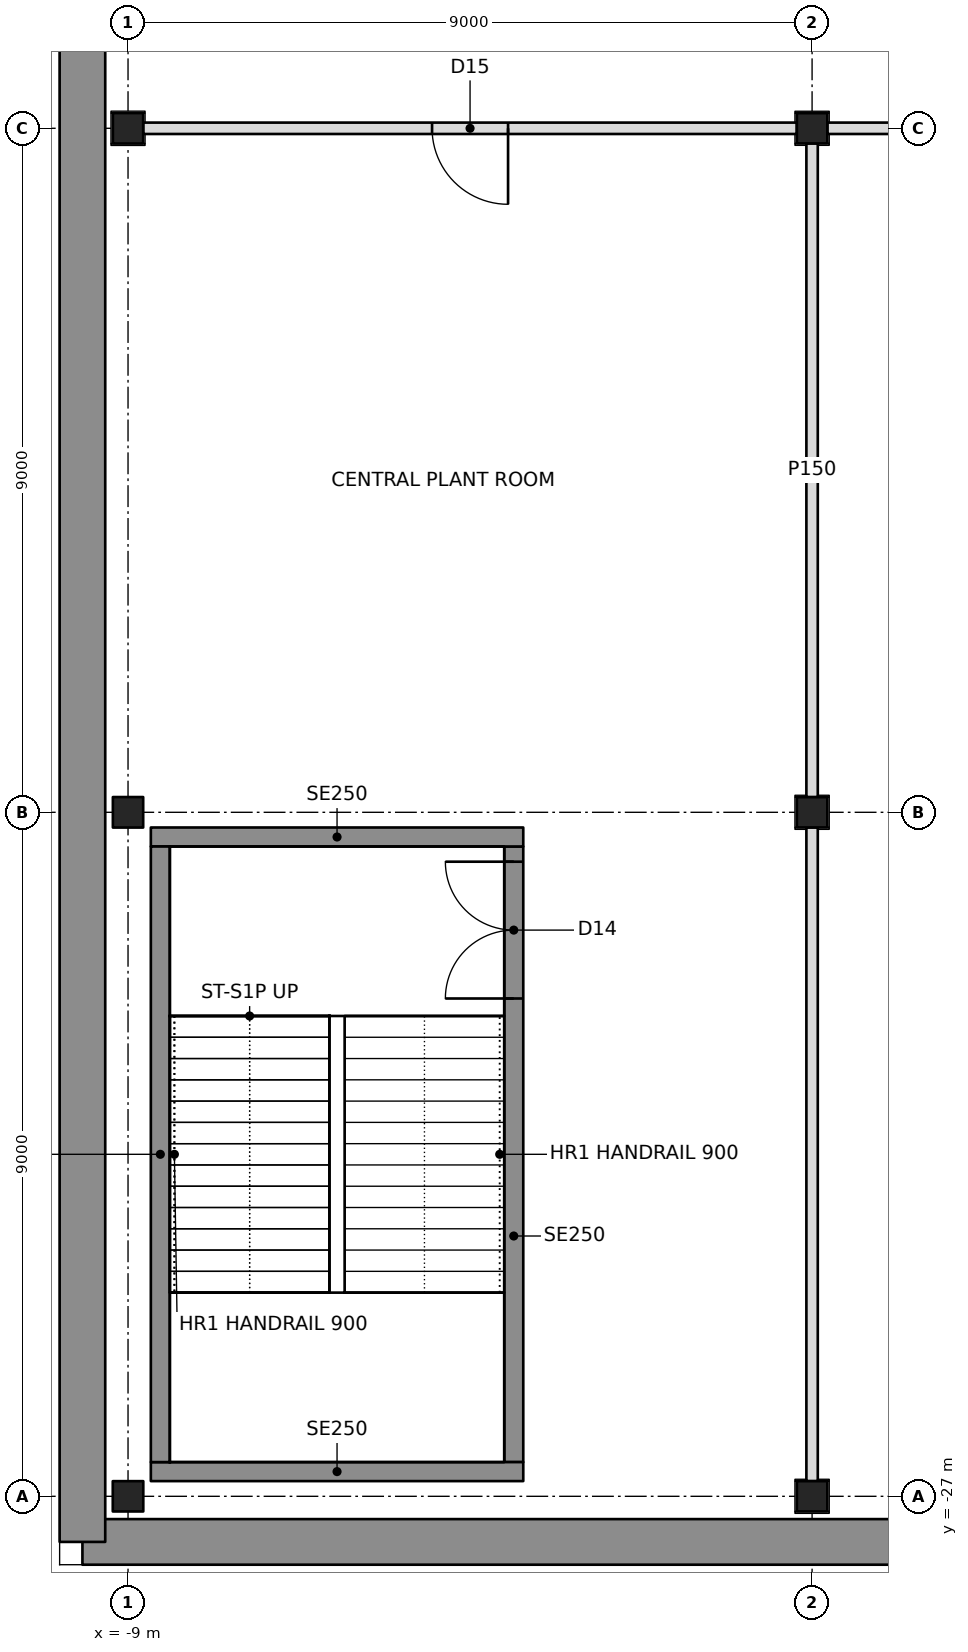
"""IFC4 building model, lengths in metres.
Left out: names, types, materials, properties, quantities, classifications, styles, units other than length and angle.
Written with IfcOpenShell. Run it as: python <this file> out.ifc"""

import sys

from ifc_helpers import new_model, si_unit, direction, frame, frame_2d, origin, origin_2d, place, context, subcontext, project, spatial, rectangle, i_section, extrude, element, fill, save


model = new_model("IFC4")
c1 = context("Model", 3, precision=1e-05, world=origin(), true_north=direction((0.0, 1.0)))
c2 = subcontext(c1, "Body", "Model", "MODEL_VIEW")
j1 = project(units=[si_unit("LENGTHUNIT", "METRE"), si_unit("PLANEANGLEUNIT", "RADIAN")], contexts=[c1])
p1 = place(None, origin())
s1 = spatial("IfcSite", under=j1, at=p1, CompositionType="ELEMENT")
p2 = place(p1, origin())
s2 = spatial("IfcBuilding", under=s1, at=p2, CompositionType="ELEMENT")
p3 = place(p2, frame((0.0, 0.0, -10.5)))
s3 = spatial("IfcBuildingStorey", under=s2, at=p3, CompositionType="ELEMENT", Elevation=-10.5)
for number, where, z_axis, x_axis in (
    (1, (-9.0, -27.0, -0.5), (0.0, 0.0, 1.0), (1.0, 0.0, 0.0)),
    (2, (-9.0, -18.0, -0.5), (0.0, 0.0, 1.0), (0.0, 1.0, 0.0)),
    (3, (-9.0, -9.0, -0.5), (0.0, 0.0, 1.0), (0.0, 1.0, 0.0)),
    (4, (0.0, -27.0, -0.5), (0.0, 0.0, 1.0), (1.0, 0.0, 0.0)),
    (5, (0.0, -18.0, -0.5), (0.0, 0.0, 1.0), (1.0, 0.0, 0.0)),
    (6, (0.0, -9.0, -0.5), (0.0, 0.0, 1.0), (1.0, 0.0, 0.0)),
):
    element("IfcColumn", number, at=place(p3, frame(where, z_axis=z_axis, x_axis=x_axis)), inside=s3, PredefinedType="COLUMN", context=c2, shape_type="SweptSolid", body=[
        extrude(i_section(OverallWidth=0.401, OverallDepth=0.399, WebThickness=0.025, FlangeThickness=0.04, at=origin_2d()), origin(), (0.0, 0.0, 1.0), 5.5),
    ])
for number, where, z_axis, x_axis in (
    (7, (-9.6, -27.6, 0.0), (0.0, 0.0, 1.0), (1.0, 0.0, 0.0)),
    (8, (-9.6, 45.6, 0.0), (0.0, 0.0, 1.0), (0.0, -1.0, 0.0)),
):
    element("IfcWall", number, at=place(p3, frame(where, z_axis=z_axis, x_axis=x_axis)), inside=s3, PredefinedType="SOLIDWALL", context=c2, shape_type="SweptSolid", body=[
        extrude(rectangle(XDim=73.2, YDim=0.6, at=frame_2d((36.6, 0.0))), origin(), (0.0, 0.0, 1.0), 4.7),
    ])
p4 = place(p3, frame((-8.801, -9.0, 0.0), z_axis=(0.0, 0.0, 1.0), x_axis=(1.0, 0.0, 0.0)))
e9 = element("IfcWall", 9, at=p4, inside=s3, PredefinedType="PARTITIONING", context=c2, shape_type="SweptSolid", body=[
    extrude(rectangle(XDim=8.6, YDim=0.15, at=frame_2d((4.3, 0.0))), origin(), (0.0, 0.0, 1.0), 3.842),
])
p5 = place(p4, frame((3.801, 0.0, 0.0)))
e10 = element("IfcOpeningElement", 10, at=p5, cuts=e9, PredefinedType="OPENING", context=c2, shape_type="SweptSolid", body=[
    extrude(rectangle(XDim=1.0, YDim=2.1, at=frame_2d((0.5, 1.05))), frame((0.0, 0.085, 0.0), z_axis=(0.0, -1.0, 0.0), x_axis=(1.0, 0.0, 0.0)), (0.0, 0.0, 1.0), 0.17),
])
for number, where, z_axis, x_axis in (
    (11, (0.0, -9.199, 0.0), (0.0, 0.0, 1.0), (0.0, -1.0, 0.0)),
    (12, (0.0, -18.199, 0.0), (0.0, 0.0, 1.0), (0.0, -1.0, 0.0)),
):
    element("IfcWall", number, at=place(p3, frame(where, z_axis=z_axis, x_axis=x_axis)), inside=s3, PredefinedType="PARTITIONING", context=c2, shape_type="SweptSolid", body=[
        extrude(rectangle(XDim=8.601, YDim=0.15, at=frame_2d((4.301, 0.0))), origin(), (0.0, 0.0, 1.0), 3.842),
    ])
p6 = place(p3, frame((0.201, -9.0, 0.0), z_axis=(0.0, 0.0, 1.0), x_axis=(1.0, 0.0, 0.0)))
e13 = element("IfcWall", 13, at=p6, inside=s3, PredefinedType="PARTITIONING", context=c2, shape_type="SweptSolid", body=[
    extrude(rectangle(XDim=8.599, YDim=0.15, at=frame_2d((4.299, 0.0))), origin(), (0.0, 0.0, 1.0), 3.842),
])
p7 = place(p6, frame((3.799, 0.0, 0.0)))
e14 = element("IfcOpeningElement", 14, at=p7, cuts=e13, PredefinedType="OPENING", context=c2, shape_type="SweptSolid", body=[
    extrude(rectangle(XDim=1.0, YDim=2.1, at=frame_2d((0.5, 1.05))), frame((0.0, 0.085, 0.0), z_axis=(0.0, -1.0, 0.0), x_axis=(1.0, 0.0, 0.0)), (0.0, 0.0, 1.0), 0.17),
])
for number, where, z_axis, x_axis in (
    (15, (-8.7, -26.675, 0.0), (0.0, 0.0, 1.0), (1.0, 0.0, 0.0)),
    (16, (-8.7, -18.325, 0.0), (0.0, 0.0, 1.0), (1.0, 0.0, 0.0)),
):
    element("IfcWall", number, at=place(p3, frame(where, z_axis=z_axis, x_axis=x_axis)), inside=s3, PredefinedType="SOLIDWALL", context=c2, shape_type="SweptSolid", body=[
        extrude(rectangle(XDim=4.9, YDim=0.25, at=frame_2d((2.45, 0.0))), origin(), (0.0, 0.0, 1.0), 4.7),
    ])
p8 = place(p3, frame((-8.575, -26.55, 0.0), z_axis=(0.0, 0.0, 1.0), x_axis=(0.0, 1.0, 0.0)))
e17 = element("IfcWall", 17, at=p8, inside=s3, PredefinedType="SOLIDWALL", context=c2, shape_type="SweptSolid", body=[
    extrude(rectangle(XDim=8.1, YDim=0.25, at=frame_2d((4.05, 0.0))), origin(), (0.0, 0.0, 1.0), 4.7),
])
p9 = place(p3, frame((-3.925, -26.55, 0.0), z_axis=(0.0, 0.0, 1.0), x_axis=(0.0, 1.0, 0.0)))
e18 = element("IfcWall", 18, at=p9, inside=s3, PredefinedType="SOLIDWALL", context=c2, shape_type="SweptSolid", body=[
    extrude(rectangle(XDim=8.1, YDim=0.25, at=frame_2d((4.05, 0.0))), origin(), (0.0, 0.0, 1.0), 4.7),
])
p10 = place(p9, frame((6.1, 0.0, 0.0)))
e19 = element("IfcOpeningElement", 19, at=p10, cuts=e18, PredefinedType="OPENING", context=c2, shape_type="SweptSolid", body=[
    extrude(rectangle(XDim=1.8, YDim=2.1, at=frame_2d((0.9, 1.05))), frame((0.0, 0.135, 0.0), z_axis=(0.0, -1.0, 0.0), x_axis=(1.0, 0.0, 0.0)), (0.0, 0.0, 1.0), 0.27),
])
p11 = place(p5, frame((1.0, 0.0, 0.0), z_axis=(0.0, 0.0, 1.0), x_axis=(-1.0, 0.0, 0.0)))
e20 = element("IfcDoor", 20, at=p11, inside=s3, OperationType="SINGLE_SWING_LEFT", PredefinedType="DOOR", context=c2, shape_type="SweptSolid", body=[
    extrude(rectangle(XDim=1.0, YDim=2.1, at=frame_2d((0.5, 1.05))), frame((0.0, 0.025, 0.0), z_axis=(0.0, -1.0, 0.0), x_axis=(1.0, 0.0, 0.0)), (0.0, 0.0, 1.0), 0.05),
])
fill(e10, e20)
p12 = place(p10, origin())
e21 = element("IfcDoor", 21, at=p12, inside=s3, OperationType="DOUBLE_DOOR_SINGLE_SWING", PredefinedType="DOOR", context=c2, shape_type="SweptSolid", body=[
    extrude(rectangle(XDim=1.8, YDim=2.1, at=frame_2d((0.9, 1.05))), frame((0.0, 0.025, 0.0), z_axis=(0.0, -1.0, 0.0), x_axis=(1.0, 0.0, 0.0)), (0.0, 0.0, 1.0), 0.05),
])
fill(e19, e21)
save(model, sys.argv[1])
